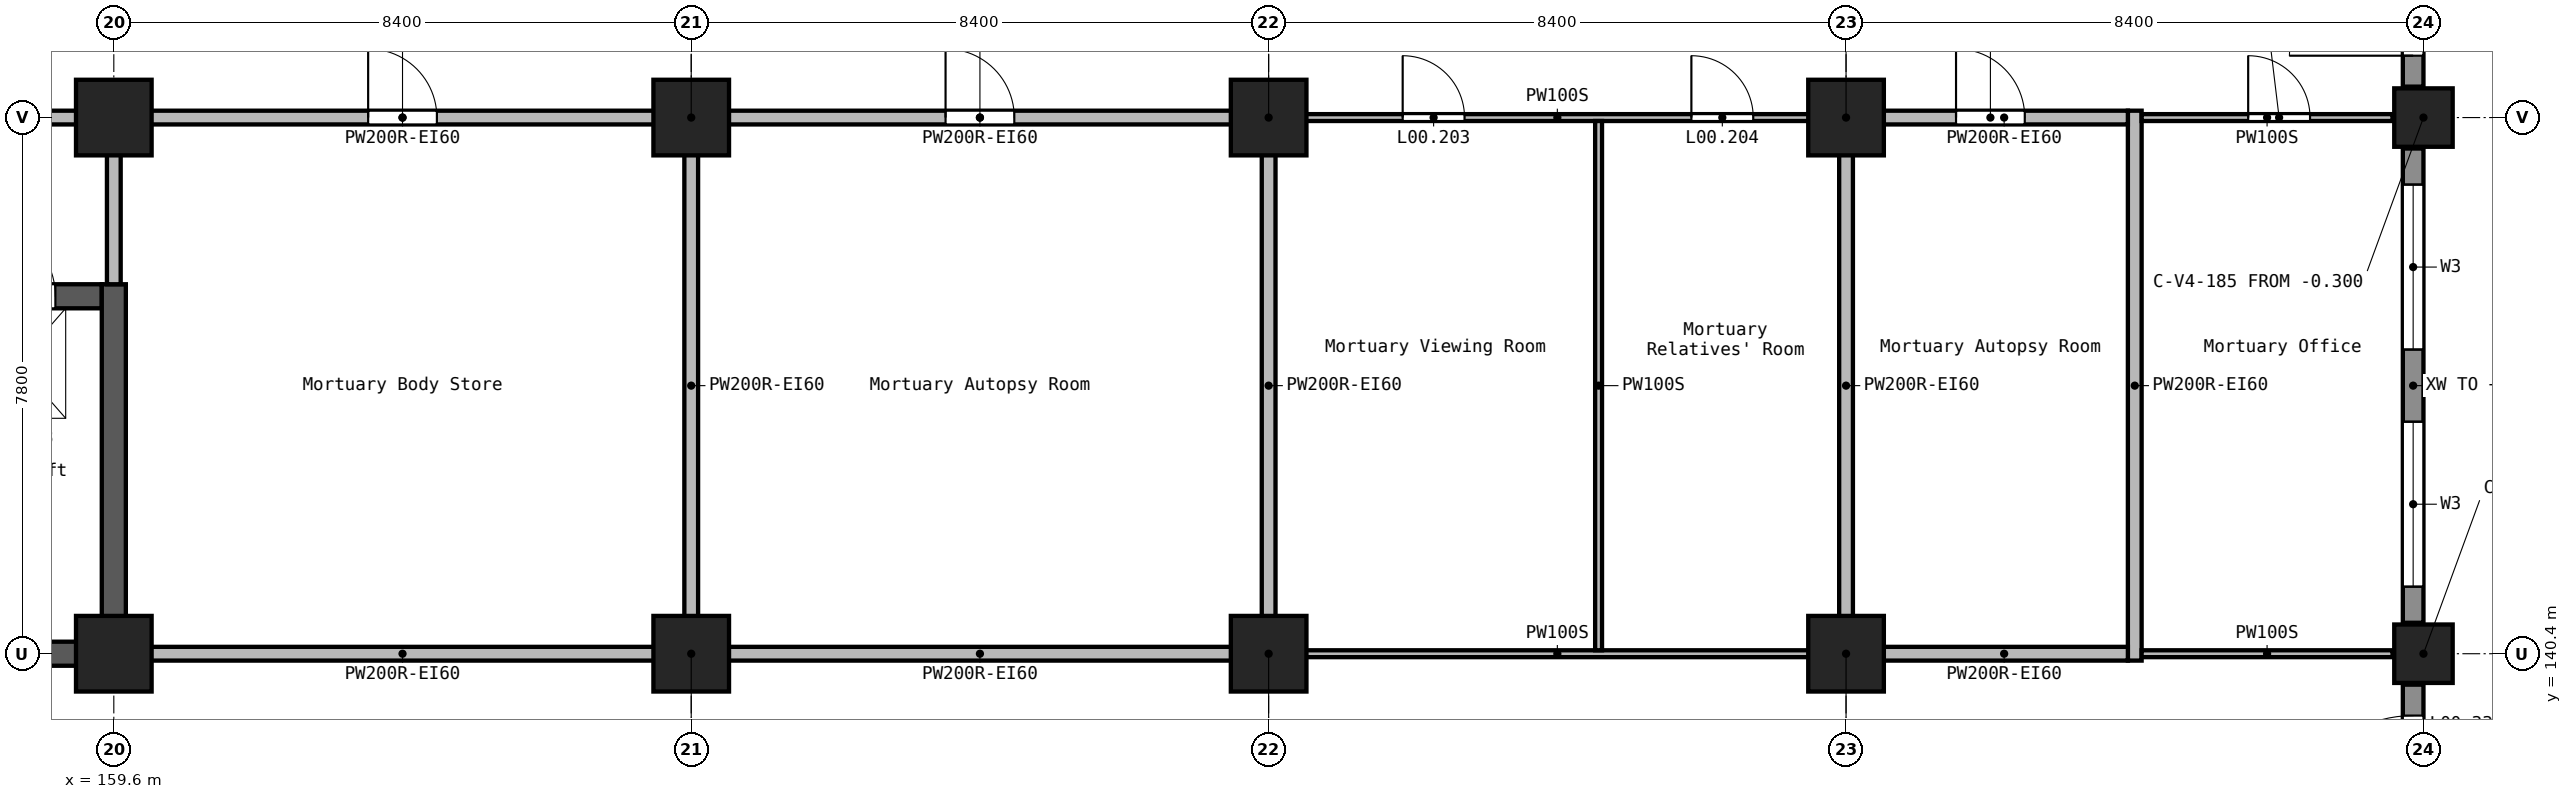
"""IFC4 building model, lengths in metres.
Left out: names, types, materials, properties, quantities, classifications, styles, units other than length and angle.
Written with IfcOpenShell. Run it as: python <this file> out.ifc"""

import sys

from ifc_helpers import new_model, si_unit, direction, frame, frame_2d, origin, origin_2d, place, context, subcontext, project, spatial, rectangle, extrude, element, fill, save


model = new_model("IFC4")
c1 = context("Model", 3, precision=1e-05, world=origin(), true_north=direction((0.0, 1.0)))
c2 = subcontext(c1, "Body", "Model", "MODEL_VIEW")
j1 = project(units=[si_unit("LENGTHUNIT", "METRE"), si_unit("PLANEANGLEUNIT", "RADIAN")], contexts=[c1])
p1 = place(None, origin())
s1 = spatial("IfcSite", under=j1, at=p1, CompositionType="ELEMENT")
p2 = place(p1, origin())
s2 = spatial("IfcBuilding", under=s1, at=p2, CompositionType="ELEMENT")
p3 = place(p2, origin())
s3 = spatial("IfcBuildingStorey", under=s2, at=p3, CompositionType="ELEMENT", Elevation=0.0)
for number, where, z_axis, x_axis in (
    (1, (159.6, 140.4, -0.3), (0.0, 0.0, 1.0), (1.0, 0.0, 0.0)),
    (2, (159.6, 148.2, -0.3), (0.0, 0.0, 1.0), (1.0, 0.0, 0.0)),
    (3, (168.0, 140.4, -0.3), (0.0, 0.0, 1.0), (1.0, 0.0, 0.0)),
    (4, (168.0, 148.2, -0.3), (0.0, 0.0, 1.0), (1.0, 0.0, 0.0)),
    (5, (176.4, 140.4, -0.3), (0.0, 0.0, 1.0), (1.0, 0.0, 0.0)),
    (6, (176.4, 148.2, -0.3), (0.0, 0.0, 1.0), (1.0, 0.0, 0.0)),
    (7, (184.8, 140.4, -0.3), (0.0, 0.0, 1.0), (1.0, 0.0, 0.0)),
    (8, (184.8, 148.2, -0.3), (0.0, 0.0, 1.0), (1.0, 0.0, 0.0)),
):
    element("IfcColumn", number, at=place(p3, frame(where, z_axis=z_axis, x_axis=x_axis)), inside=s3, PredefinedType="COLUMN", context=c2, shape_type="SweptSolid", body=[
        extrude(rectangle(XDim=1.1, YDim=1.1, at=origin_2d()), origin(), (0.0, 0.0, 1.0), 5.7),
    ])
for number, where, z_axis, x_axis in (
    (9, (193.2, 140.4, -0.3), (0.0, 0.0, 1.0), (1.0, 0.0, 0.0)),
    (10, (193.2, 148.2, -0.3), (0.0, 0.0, 1.0), (1.0, 0.0, 0.0)),
):
    element("IfcColumn", number, at=place(p3, frame(where, z_axis=z_axis, x_axis=x_axis)), inside=s3, PredefinedType="COLUMN", context=c2, shape_type="SweptSolid", body=[
        extrude(rectangle(XDim=0.85, YDim=0.85, at=origin_2d()), origin(), (0.0, 0.0, 1.0), 5.7),
    ])
p4 = place(p3, frame((156.8, 140.4, -0.3), z_axis=(0.0, 0.0, 1.0), x_axis=(1.0, 0.0, 0.0)))
e11 = element("IfcWall", 11, at=p4, inside=s3, PredefinedType="SHEAR", context=c2, shape_type="SweptSolid", body=[
    extrude(rectangle(XDim=2.625, YDim=0.35, at=frame_2d((1.312, 0.0))), origin(), (0.0, 0.0, 1.0), 5.7),
])
p5 = place(p3, frame((156.8, 145.6, -0.3), z_axis=(0.0, 0.0, 1.0), x_axis=(1.0, 0.0, 0.0)))
e12 = element("IfcWall", 12, at=p5, inside=s3, PredefinedType="SHEAR", context=c2, shape_type="SweptSolid", body=[
    extrude(rectangle(XDim=2.625, YDim=0.35, at=frame_2d((1.312, 0.0))), origin(), (0.0, 0.0, 1.0), 5.7),
])
p6 = place(p5, frame((0.85, 0.0, 0.3)))
e13 = element("IfcOpeningElement", 13, at=p6, cuts=e12, PredefinedType="OPENING", context=c2, shape_type="SweptSolid", body=[
    extrude(rectangle(XDim=1.1, YDim=2.1, at=frame_2d((0.55, 1.05))), frame((0.0, 0.185, 0.0), z_axis=(0.0, -1.0, 0.0), x_axis=(1.0, 0.0, 0.0)), (0.0, 0.0, 1.0), 0.37),
])
p7 = place(p3, frame((159.6, 140.225, -0.3), z_axis=(0.0, 0.0, 1.0), x_axis=(0.0, 1.0, 0.0)))
e14 = element("IfcWall", 14, at=p7, inside=s3, PredefinedType="SHEAR", context=c2, shape_type="SweptSolid", body=[
    extrude(rectangle(XDim=5.55, YDim=0.35, at=frame_2d((2.775, 0.0))), origin(), (0.0, 0.0, 1.0), 5.7),
])
p8 = place(p3, frame((193.05, 137.25, 0.0), z_axis=(0.0, 0.0, 1.0), x_axis=(0.0, 1.0, 0.0)))
e15 = element("IfcWall", 15, at=p8, inside=s3, PredefinedType="STANDARD", context=c2, shape_type="SweptSolid", body=[
    extrude(rectangle(XDim=2.7, YDim=0.3, at=frame_2d((1.35, 0.0))), origin(), (0.0, 0.0, 1.0), 4.25),
])
p9 = place(p8, frame((0.45, 0.0, 0.0)))
e16 = element("IfcOpeningElement", 16, at=p9, cuts=e15, PredefinedType="OPENING", context=c2, shape_type="SweptSolid", body=[
    extrude(rectangle(XDim=1.8, YDim=2.1, at=frame_2d((0.9, 1.05))), frame((0.0, 0.16, 0.0), z_axis=(0.0, -1.0, 0.0), x_axis=(1.0, 0.0, 0.0)), (0.0, 0.0, 1.0), 0.32),
])
p10 = place(p3, frame((193.05, 140.85, 0.0), z_axis=(0.0, 0.0, 1.0), x_axis=(0.0, 1.0, 0.0)))
e17 = element("IfcWall", 17, at=p10, inside=s3, PredefinedType="STANDARD", context=c2, shape_type="SweptSolid", body=[
    extrude(rectangle(XDim=6.9, YDim=0.3, at=frame_2d((3.45, 0.0))), origin(), (0.0, 0.0, 1.0), 4.25),
])
p11 = place(p10, frame((0.525, 0.0, 0.9)))
e18 = element("IfcOpeningElement", 18, at=p11, cuts=e17, PredefinedType="OPENING", context=c2, shape_type="SweptSolid", body=[
    extrude(rectangle(XDim=2.4, YDim=1.5, at=frame_2d((1.2, 0.75))), frame((0.0, 0.16, 0.0), z_axis=(0.0, -1.0, 0.0), x_axis=(1.0, 0.0, 0.0)), (0.0, 0.0, 1.0), 0.32),
])
p12 = place(p10, frame((3.975, 0.0, 0.9)))
e19 = element("IfcOpeningElement", 19, at=p12, cuts=e17, PredefinedType="OPENING", context=c2, shape_type="SweptSolid", body=[
    extrude(rectangle(XDim=2.4, YDim=1.5, at=frame_2d((1.2, 0.75))), frame((0.0, 0.16, 0.0), z_axis=(0.0, -1.0, 0.0), x_axis=(1.0, 0.0, 0.0)), (0.0, 0.0, 1.0), 0.32),
])
p13 = place(p3, frame((193.05, 148.65, 0.0), z_axis=(0.0, 0.0, 1.0), x_axis=(0.0, 1.0, 0.0)))
e20 = element("IfcWall", 20, at=p13, inside=s3, PredefinedType="STANDARD", context=c2, shape_type="SweptSolid", body=[
    extrude(rectangle(XDim=2.7, YDim=0.3, at=frame_2d((1.35, 0.0))), origin(), (0.0, 0.0, 1.0), 4.25),
])
p14 = place(p13, frame((0.45, 0.0, 0.0)))
e21 = element("IfcOpeningElement", 21, at=p14, cuts=e20, PredefinedType="OPENING", context=c2, shape_type="SweptSolid", body=[
    extrude(rectangle(XDim=1.8, YDim=2.1, at=frame_2d((0.9, 1.05))), frame((0.0, 0.16, 0.0), z_axis=(0.0, -1.0, 0.0), x_axis=(1.0, 0.0, 0.0)), (0.0, 0.0, 1.0), 0.32),
])
for number, where, z_axis, x_axis in (
    (22, (160.1, 140.4, 0.0), (0.0, 0.0, 1.0), (1.0, 0.0, 0.0)),
    (23, (168.5, 140.4, 0.0), (0.0, 0.0, 1.0), (1.0, 0.0, 0.0)),
):
    element("IfcWall", number, at=place(p3, frame(where, z_axis=z_axis, x_axis=x_axis)), inside=s3, PredefinedType="SOLIDWALL", context=c2, shape_type="SweptSolid", body=[
        extrude(rectangle(XDim=7.4, YDim=0.2, at=frame_2d((3.7, 0.0))), origin(), (0.0, 0.0, 1.0), 5.05),
    ])
p15 = place(p3, frame((160.1, 148.2, 0.0), z_axis=(0.0, 0.0, 1.0), x_axis=(1.0, 0.0, 0.0)))
e24 = element("IfcWall", 24, at=p15, inside=s3, PredefinedType="SOLIDWALL", context=c2, shape_type="SweptSolid", body=[
    extrude(rectangle(XDim=7.4, YDim=0.2, at=frame_2d((3.7, 0.0))), origin(), (0.0, 0.0, 1.0), 5.05),
])
p16 = place(p15, frame((3.2, 0.0, 0.0)))
e25 = element("IfcOpeningElement", 25, at=p16, cuts=e24, PredefinedType="OPENING", context=c2, shape_type="SweptSolid", body=[
    extrude(rectangle(XDim=1.0, YDim=2.1, at=frame_2d((0.5, 1.05))), frame((0.0, 0.11, 0.0), z_axis=(0.0, -1.0, 0.0), x_axis=(1.0, 0.0, 0.0)), (0.0, 0.0, 1.0), 0.22),
])
p17 = place(p3, frame((168.5, 148.2, 0.0), z_axis=(0.0, 0.0, 1.0), x_axis=(1.0, 0.0, 0.0)))
e26 = element("IfcWall", 26, at=p17, inside=s3, PredefinedType="SOLIDWALL", context=c2, shape_type="SweptSolid", body=[
    extrude(rectangle(XDim=7.4, YDim=0.2, at=frame_2d((3.7, 0.0))), origin(), (0.0, 0.0, 1.0), 5.05),
])
p18 = place(p17, frame((3.2, 0.0, 0.0)))
e27 = element("IfcOpeningElement", 27, at=p18, cuts=e26, PredefinedType="OPENING", context=c2, shape_type="SweptSolid", body=[
    extrude(rectangle(XDim=1.0, YDim=2.1, at=frame_2d((0.5, 1.05))), frame((0.0, 0.11, 0.0), z_axis=(0.0, -1.0, 0.0), x_axis=(1.0, 0.0, 0.0)), (0.0, 0.0, 1.0), 0.22),
])
p19 = place(p3, frame((151.7, 148.2, 0.0), z_axis=(0.0, 0.0, 1.0), x_axis=(1.0, 0.0, 0.0)))
e28 = element("IfcWall", 28, at=p19, inside=s3, PredefinedType="SOLIDWALL", context=c2, shape_type="SweptSolid", body=[
    extrude(rectangle(XDim=7.4, YDim=0.2, at=frame_2d((3.7, 0.0))), origin(), (0.0, 0.0, 1.0), 5.05),
])
p20 = place(p19, frame((2.8, 0.0, 0.0)))
e29 = element("IfcOpeningElement", 29, at=p20, cuts=e28, PredefinedType="OPENING", context=c2, shape_type="SweptSolid", body=[
    extrude(rectangle(XDim=1.8, YDim=2.1, at=frame_2d((0.9, 1.05))), frame((0.0, 0.11, 0.0), z_axis=(0.0, -1.0, 0.0), x_axis=(1.0, 0.0, 0.0)), (0.0, 0.0, 1.0), 0.22),
])
for number, where, z_axis, x_axis in (
    (30, (168.0, 140.9, 0.0), (0.0, 0.0, 1.0), (0.0, 1.0, 0.0)),
    (31, (176.4, 140.9, 0.0), (0.0, 0.0, 1.0), (0.0, 1.0, 0.0)),
    (32, (184.8, 140.9, 0.0), (0.0, 0.0, 1.0), (0.0, 1.0, 0.0)),
):
    element("IfcWall", number, at=place(p3, frame(where, z_axis=z_axis, x_axis=x_axis)), inside=s3, PredefinedType="SOLIDWALL", context=c2, shape_type="SweptSolid", body=[
        extrude(rectangle(XDim=6.8, YDim=0.2, at=frame_2d((3.4, 0.0))), origin(), (0.0, 0.0, 1.0), 5.05),
    ])
p21 = place(p3, frame((189.0, 140.3, 0.0), z_axis=(0.0, 0.0, 1.0), x_axis=(0.0, 1.0, 0.0)))
e33 = element("IfcWall", 33, at=p21, inside=s3, PredefinedType="SOLIDWALL", context=c2, shape_type="SweptSolid", body=[
    extrude(rectangle(XDim=8.0, YDim=0.2, at=frame_2d((4.0, 0.0))), origin(), (0.0, 0.0, 1.0), 5.05),
])
p22 = place(p3, frame((185.3, 140.4, 0.0), z_axis=(0.0, 0.0, 1.0), x_axis=(1.0, 0.0, 0.0)))
e34 = element("IfcWall", 34, at=p22, inside=s3, PredefinedType="SOLIDWALL", context=c2, shape_type="SweptSolid", body=[
    extrude(rectangle(XDim=3.6, YDim=0.2, at=frame_2d((1.8, 0.0))), origin(), (0.0, 0.0, 1.0), 5.05),
])
p23 = place(p3, frame((185.3, 148.2, 0.0), z_axis=(0.0, 0.0, 1.0), x_axis=(1.0, 0.0, 0.0)))
e35 = element("IfcWall", 35, at=p23, inside=s3, PredefinedType="SOLIDWALL", context=c2, shape_type="SweptSolid", body=[
    extrude(rectangle(XDim=3.6, YDim=0.2, at=frame_2d((1.8, 0.0))), origin(), (0.0, 0.0, 1.0), 5.05),
])
p24 = place(p23, frame((1.1, 0.0, 0.0)))
e36 = element("IfcOpeningElement", 36, at=p24, cuts=e35, PredefinedType="OPENING", context=c2, shape_type="SweptSolid", body=[
    extrude(rectangle(XDim=1.0, YDim=2.1, at=frame_2d((0.5, 1.05))), frame((0.0, 0.11, 0.0), z_axis=(0.0, -1.0, 0.0), x_axis=(1.0, 0.0, 0.0)), (0.0, 0.0, 1.0), 0.22),
])
p25 = place(p3, frame((159.6, 145.775, 0.0), z_axis=(0.0, 0.0, 1.0), x_axis=(0.0, 1.0, 0.0)))
e37 = element("IfcWall", 37, at=p25, inside=s3, PredefinedType="SOLIDWALL", context=c2, shape_type="SweptSolid", body=[
    extrude(rectangle(XDim=1.925, YDim=0.2, at=frame_2d((0.962, 0.0))), origin(), (0.0, 0.0, 1.0), 5.05),
])
p26 = place(p3, frame((176.9, 140.4, 0.0), z_axis=(0.0, 0.0, 1.0), x_axis=(1.0, 0.0, 0.0)))
e38 = element("IfcWall", 38, at=p26, inside=s3, PredefinedType="PARTITIONING", context=c2, shape_type="SweptSolid", body=[
    extrude(rectangle(XDim=7.4, YDim=0.1, at=frame_2d((3.7, 0.0))), origin(), (0.0, 0.0, 1.0), 5.05),
])
p27 = place(p3, frame((176.9, 148.2, 0.0), z_axis=(0.0, 0.0, 1.0), x_axis=(1.0, 0.0, 0.0)))
e39 = element("IfcWall", 39, at=p27, inside=s3, PredefinedType="PARTITIONING", context=c2, shape_type="SweptSolid", body=[
    extrude(rectangle(XDim=7.4, YDim=0.1, at=frame_2d((3.7, 0.0))), origin(), (0.0, 0.0, 1.0), 5.05),
])
p28 = place(p27, frame((1.45, 0.0, 0.0)))
e40 = element("IfcOpeningElement", 40, at=p28, cuts=e39, PredefinedType="OPENING", context=c2, shape_type="SweptSolid", body=[
    extrude(rectangle(XDim=0.9, YDim=2.1, at=frame_2d((0.45, 1.05))), frame((0.0, 0.06, 0.0), z_axis=(0.0, -1.0, 0.0), x_axis=(1.0, 0.0, 0.0)), (0.0, 0.0, 1.0), 0.12),
])
p29 = place(p27, frame((5.65, 0.0, 0.0)))
e41 = element("IfcOpeningElement", 41, at=p29, cuts=e39, PredefinedType="OPENING", context=c2, shape_type="SweptSolid", body=[
    extrude(rectangle(XDim=0.9, YDim=2.1, at=frame_2d((0.45, 1.05))), frame((0.0, 0.06, 0.0), z_axis=(0.0, -1.0, 0.0), x_axis=(1.0, 0.0, 0.0)), (0.0, 0.0, 1.0), 0.12),
])
p30 = place(p3, frame((181.2, 140.45, 0.0), z_axis=(0.0, 0.0, 1.0), x_axis=(0.0, 1.0, 0.0)))
e42 = element("IfcWall", 42, at=p30, inside=s3, PredefinedType="PARTITIONING", context=c2, shape_type="SweptSolid", body=[
    extrude(rectangle(XDim=7.7, YDim=0.1, at=frame_2d((3.85, 0.0))), origin(), (0.0, 0.0, 1.0), 5.05),
])
p31 = place(p3, frame((189.1, 140.4, 0.0), z_axis=(0.0, 0.0, 1.0), x_axis=(1.0, 0.0, 0.0)))
e43 = element("IfcWall", 43, at=p31, inside=s3, PredefinedType="PARTITIONING", context=c2, shape_type="SweptSolid", body=[
    extrude(rectangle(XDim=3.65, YDim=0.1, at=frame_2d((1.825, 0.0))), origin(), (0.0, 0.0, 1.0), 5.05),
])
p32 = place(p3, frame((189.1, 148.2, 0.0), z_axis=(0.0, 0.0, 1.0), x_axis=(1.0, 0.0, 0.0)))
e44 = element("IfcWall", 44, at=p32, inside=s3, PredefinedType="PARTITIONING", context=c2, shape_type="SweptSolid", body=[
    extrude(rectangle(XDim=3.65, YDim=0.1, at=frame_2d((1.825, 0.0))), origin(), (0.0, 0.0, 1.0), 5.05),
])
p33 = place(p32, frame((1.55, 0.0, 0.0)))
e45 = element("IfcOpeningElement", 45, at=p33, cuts=e44, PredefinedType="OPENING", context=c2, shape_type="SweptSolid", body=[
    extrude(rectangle(XDim=0.9, YDim=2.1, at=frame_2d((0.45, 1.05))), frame((0.0, 0.06, 0.0), z_axis=(0.0, -1.0, 0.0), x_axis=(1.0, 0.0, 0.0)), (0.0, 0.0, 1.0), 0.12),
])
p34 = place(p14, frame((1.8, 0.0, 0.0), z_axis=(0.0, 0.0, 1.0), x_axis=(-1.0, 0.0, 0.0)))
e46 = element("IfcDoor", 46, at=p34, inside=s3, OperationType="SINGLE_SWING_LEFT", PredefinedType="DOOR", context=c2, shape_type="SweptSolid", body=[
    extrude(rectangle(XDim=1.8, YDim=2.1, at=frame_2d((0.9, 1.05))), frame((0.0, 0.025, 0.0), z_axis=(0.0, -1.0, 0.0), x_axis=(1.0, 0.0, 0.0)), (0.0, 0.0, 1.0), 0.05),
])
fill(e21, e46)
p35 = place(p9, frame((1.8, 0.0, 0.0), z_axis=(0.0, 0.0, 1.0), x_axis=(-1.0, 0.0, 0.0)))
e47 = element("IfcDoor", 47, at=p35, inside=s3, OperationType="SINGLE_SWING_LEFT", PredefinedType="DOOR", context=c2, shape_type="SweptSolid", body=[
    extrude(rectangle(XDim=1.8, YDim=2.1, at=frame_2d((0.9, 1.05))), frame((0.0, 0.025, 0.0), z_axis=(0.0, -1.0, 0.0), x_axis=(1.0, 0.0, 0.0)), (0.0, 0.0, 1.0), 0.05),
])
fill(e16, e47)
p36 = place(p11, origin())
e48 = element("IfcWindow", 48, at=p36, inside=s3, PartitioningType="SINGLE_PANEL", PredefinedType="WINDOW", context=c2, shape_type="SweptSolid", body=[
    extrude(rectangle(XDim=2.4, YDim=1.5, at=frame_2d((1.2, 0.75))), frame((0.0, 0.03, 0.0), z_axis=(0.0, -1.0, 0.0), x_axis=(1.0, 0.0, 0.0)), (0.0, 0.0, 1.0), 0.06),
])
fill(e18, e48)
p37 = place(p12, origin())
e49 = element("IfcWindow", 49, at=p37, inside=s3, PartitioningType="SINGLE_PANEL", PredefinedType="WINDOW", context=c2, shape_type="SweptSolid", body=[
    extrude(rectangle(XDim=2.4, YDim=1.5, at=frame_2d((1.2, 0.75))), frame((0.0, 0.03, 0.0), z_axis=(0.0, -1.0, 0.0), x_axis=(1.0, 0.0, 0.0)), (0.0, 0.0, 1.0), 0.06),
])
fill(e19, e49)
p38 = place(p16, frame((1.0, 0.0, 0.0), z_axis=(0.0, 0.0, 1.0), x_axis=(-1.0, 0.0, 0.0)))
e50 = element("IfcDoor", 50, at=p38, inside=s3, OperationType="SINGLE_SWING_RIGHT", PredefinedType="DOOR", context=c2, shape_type="SweptSolid", body=[
    extrude(rectangle(XDim=1.0, YDim=2.1, at=frame_2d((0.5, 1.05))), frame((0.0, 0.025, 0.0), z_axis=(0.0, -1.0, 0.0), x_axis=(1.0, 0.0, 0.0)), (0.0, 0.0, 1.0), 0.05),
])
fill(e25, e50)
p39 = place(p18, frame((1.0, 0.0, 0.0), z_axis=(0.0, 0.0, 1.0), x_axis=(-1.0, 0.0, 0.0)))
e51 = element("IfcDoor", 51, at=p39, inside=s3, OperationType="SINGLE_SWING_RIGHT", PredefinedType="DOOR", context=c2, shape_type="SweptSolid", body=[
    extrude(rectangle(XDim=1.0, YDim=2.1, at=frame_2d((0.5, 1.05))), frame((0.0, 0.025, 0.0), z_axis=(0.0, -1.0, 0.0), x_axis=(1.0, 0.0, 0.0)), (0.0, 0.0, 1.0), 0.05),
])
fill(e27, e51)
p40 = place(p28, frame((0.9, 0.0, 0.0), z_axis=(0.0, 0.0, 1.0), x_axis=(-1.0, 0.0, 0.0)))
e52 = element("IfcDoor", 52, at=p40, inside=s3, OperationType="SINGLE_SWING_RIGHT", PredefinedType="DOOR", context=c2, shape_type="SweptSolid", body=[
    extrude(rectangle(XDim=0.9, YDim=2.1, at=frame_2d((0.45, 1.05))), frame((0.0, 0.025, 0.0), z_axis=(0.0, -1.0, 0.0), x_axis=(1.0, 0.0, 0.0)), (0.0, 0.0, 1.0), 0.05),
])
fill(e40, e52)
p41 = place(p29, frame((0.9, 0.0, 0.0), z_axis=(0.0, 0.0, 1.0), x_axis=(-1.0, 0.0, 0.0)))
e53 = element("IfcDoor", 53, at=p41, inside=s3, OperationType="SINGLE_SWING_LEFT", PredefinedType="DOOR", context=c2, shape_type="SweptSolid", body=[
    extrude(rectangle(XDim=0.9, YDim=2.1, at=frame_2d((0.45, 1.05))), frame((0.0, 0.025, 0.0), z_axis=(0.0, -1.0, 0.0), x_axis=(1.0, 0.0, 0.0)), (0.0, 0.0, 1.0), 0.05),
])
fill(e41, e53)
p42 = place(p24, frame((1.0, 0.0, 0.0), z_axis=(0.0, 0.0, 1.0), x_axis=(-1.0, 0.0, 0.0)))
e54 = element("IfcDoor", 54, at=p42, inside=s3, OperationType="SINGLE_SWING_RIGHT", PredefinedType="DOOR", context=c2, shape_type="SweptSolid", body=[
    extrude(rectangle(XDim=1.0, YDim=2.1, at=frame_2d((0.5, 1.05))), frame((0.0, 0.025, 0.0), z_axis=(0.0, -1.0, 0.0), x_axis=(1.0, 0.0, 0.0)), (0.0, 0.0, 1.0), 0.05),
])
fill(e36, e54)
p43 = place(p33, frame((0.9, 0.0, 0.0), z_axis=(0.0, 0.0, 1.0), x_axis=(-1.0, 0.0, 0.0)))
e55 = element("IfcDoor", 55, at=p43, inside=s3, OperationType="SINGLE_SWING_LEFT", PredefinedType="DOOR", context=c2, shape_type="SweptSolid", body=[
    extrude(rectangle(XDim=0.9, YDim=2.1, at=frame_2d((0.45, 1.05))), frame((0.0, 0.025, 0.0), z_axis=(0.0, -1.0, 0.0), x_axis=(1.0, 0.0, 0.0)), (0.0, 0.0, 1.0), 0.05),
])
fill(e45, e55)
p44 = place(p6, origin())
e56 = element("IfcDoor", 56, at=p44, inside=s3, OperationType="DOUBLE_DOOR_SLIDING", PredefinedType="DOOR", context=c2, shape_type="SweptSolid", body=[
    extrude(rectangle(XDim=1.1, YDim=2.1, at=frame_2d((0.55, 1.05))), frame((0.0, 0.025, 0.0), z_axis=(0.0, -1.0, 0.0), x_axis=(1.0, 0.0, 0.0)), (0.0, 0.0, 1.0), 0.05),
])
fill(e13, e56)
save(model, sys.argv[1])
